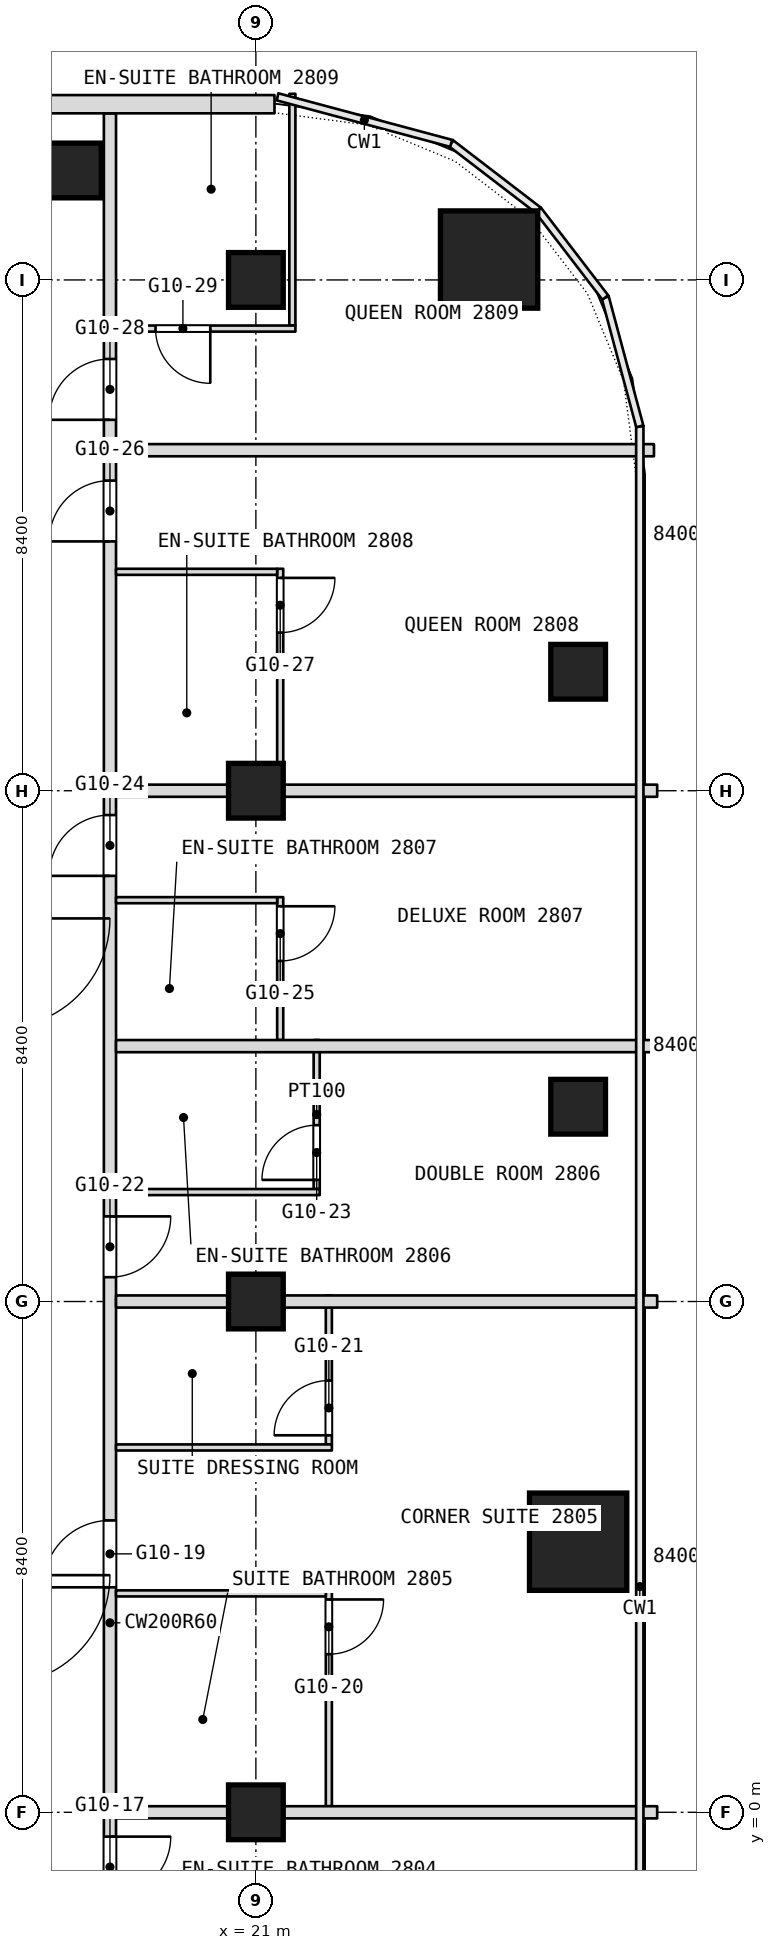
"""IFC4 building model, lengths in metres.
Left out: names, types, materials, properties, quantities, classifications, styles, units other than length and angle.
Written with IfcOpenShell. Run it as: python <this file> out.ifc"""

import sys

from ifc_helpers import new_model, si_unit, direction, frame, frame_2d, origin, origin_2d, place, context, subcontext, project, spatial, rectangle, extrude, element, fill, save


model = new_model("IFC4")
c1 = context("Model", 3, precision=1e-05, world=origin(), true_north=direction((0.0, 1.0)))
c2 = subcontext(c1, "Body", "Model", "MODEL_VIEW")
j1 = project(units=[si_unit("LENGTHUNIT", "METRE"), si_unit("PLANEANGLEUNIT", "RADIAN")], contexts=[c1])
p1 = place(None, origin())
s1 = spatial("IfcSite", under=j1, at=p1, CompositionType="ELEMENT")
p2 = place(p1, origin())
s2 = spatial("IfcBuilding", under=s1, at=p2, CompositionType="ELEMENT")
p3 = place(p2, frame((0.0, 0.0, 126.5)))
s3 = spatial("IfcBuildingStorey", under=s2, at=p3, CompositionType="ELEMENT", Elevation=126.5)
for number, where, z_axis, x_axis in (
    (1, (26.3, 4.45, 0.0), (0.0, 0.0, 1.0), (1.0, 0.0, 0.0)),
    (2, (24.835, 25.535, 0.0), (0.0, 0.0, 1.0), (1.0, 0.0, 0.0)),
):
    element("IfcColumn", number, at=place(p3, frame(where, z_axis=z_axis, x_axis=x_axis)), inside=s3, PredefinedType="COLUMN", context=c2, shape_type="SweptSolid", body=[
        extrude(rectangle(XDim=1.6, YDim=1.6, at=origin_2d()), origin(), (0.0, 0.0, 1.0), 3.6),
    ])
for number, where, z_axis, x_axis in (
    (3, (21.0, 0.0, 0.0), (0.0, 0.0, 1.0), (1.0, 0.0, 0.0)),
    (4, (21.0, 8.4, 0.0), (0.0, 0.0, 1.0), (1.0, 0.0, 0.0)),
    (5, (21.0, 16.8, 0.0), (0.0, 0.0, 1.0), (1.0, 0.0, 0.0)),
    (6, (21.0, 25.2, 0.0), (0.0, 0.0, 1.0), (1.0, 0.0, 0.0)),
    (7, (18.007, 27.0, 0.0), (0.0, 0.0, 1.0), (1.0, 0.0, 0.0)),
    (8, (26.3, 18.756, 0.0), (0.0, 0.0, 1.0), (1.0, 0.0, 0.0)),
    (9, (26.3, 11.603, 0.0), (0.0, 0.0, 1.0), (1.0, 0.0, 0.0)),
):
    element("IfcColumn", number, at=place(p3, frame(where, z_axis=z_axis, x_axis=x_axis)), inside=s3, PredefinedType="COLUMN", context=c2, shape_type="SweptSolid", body=[
        extrude(rectangle(XDim=0.9, YDim=0.9, at=origin_2d()), origin(), (0.0, 0.0, 1.0), 3.6),
    ])
p4 = place(p3, frame((22.2, 0.1, 0.0), z_axis=(0.0, 0.0, 1.0), x_axis=(0.0, 1.0, 0.0)))
e10 = element("IfcWall", 10, at=p4, inside=s3, PredefinedType="PARTITIONING", context=c2, shape_type="SweptSolid", body=[
    extrude(rectangle(XDim=3.55, YDim=0.1, at=frame_2d((1.775, 0.0))), origin(), (0.0, 0.0, 1.0), 3.34),
])
p5 = place(p4, frame((2.5, 0.0, 0.0)))
e11 = element("IfcOpeningElement", 11, at=p5, cuts=e10, PredefinedType="OPENING", context=c2, shape_type="SweptSolid", body=[
    extrude(rectangle(XDim=0.9, YDim=2.1, at=frame_2d((0.45, 1.05))), frame((0.0, 0.05, 0.0), z_axis=(0.0, -1.0, 0.0), x_axis=(1.0, 0.0, 0.0)), (0.0, 0.0, 1.0), 0.1),
])
p6 = place(p3, frame((22.2, 6.05, 0.0), z_axis=(0.0, 0.0, 1.0), x_axis=(0.0, 1.0, 0.0)))
e12 = element("IfcWall", 12, at=p6, inside=s3, PredefinedType="PARTITIONING", context=c2, shape_type="SweptSolid", body=[
    extrude(rectangle(XDim=2.45, YDim=0.1, at=frame_2d((1.225, 0.0))), origin(), (0.0, 0.0, 1.0), 3.34),
])
p7 = place(p6, frame((0.15, 0.0, 0.0)))
e13 = element("IfcOpeningElement", 13, at=p7, cuts=e12, PredefinedType="OPENING", context=c2, shape_type="SweptSolid", body=[
    extrude(rectangle(XDim=0.9, YDim=2.1, at=frame_2d((0.45, 1.05))), frame((0.0, 0.05, 0.0), z_axis=(0.0, -1.0, 0.0), x_axis=(1.0, 0.0, 0.0)), (0.0, 0.0, 1.0), 0.1),
])
p8 = place(p3, frame((22.0, 10.25, 0.0), z_axis=(0.0, 0.0, 1.0), x_axis=(0.0, 1.0, 0.0)))
e14 = element("IfcWall", 14, at=p8, inside=s3, PredefinedType="PARTITIONING", context=c2, shape_type="SweptSolid", body=[
    extrude(rectangle(XDim=2.45, YDim=0.1, at=frame_2d((1.225, 0.0))), origin(), (0.0, 0.0, 1.0), 3.34),
])
p9 = place(p8, frame((0.15, 0.0, 0.0)))
e15 = element("IfcOpeningElement", 15, at=p9, cuts=e14, PredefinedType="OPENING", context=c2, shape_type="SweptSolid", body=[
    extrude(rectangle(XDim=0.9, YDim=2.1, at=frame_2d((0.45, 1.05))), frame((0.0, 0.05, 0.0), z_axis=(0.0, -1.0, 0.0), x_axis=(1.0, 0.0, 0.0)), (0.0, 0.0, 1.0), 0.1),
])
p10 = place(p3, frame((21.6, 24.45, 0.0), z_axis=(0.0, 0.0, 1.0), x_axis=(0.0, 1.0, 0.0)))
e16 = element("IfcWall", 16, at=p10, inside=s3, PredefinedType="PARTITIONING", context=c2, shape_type="SweptSolid", body=[
    extrude(rectangle(XDim=3.811, YDim=0.1, at=frame_2d((1.906, 0.0))), origin(), (0.0, 0.0, 1.0), 3.34),
])
p11 = place(p3, frame((21.4, 12.7, 0.0), z_axis=(0.0, 0.0, 1.0), x_axis=(0.0, 1.0, 0.0)))
e17 = element("IfcWall", 17, at=p11, inside=s3, PredefinedType="PARTITIONING", context=c2, shape_type="SweptSolid", body=[
    extrude(rectangle(XDim=2.35, YDim=0.1, at=frame_2d((1.175, 0.0))), origin(), (0.0, 0.0, 1.0), 3.34),
])
p12 = place(p11, frame((1.3, 0.0, 0.0)))
e18 = element("IfcOpeningElement", 18, at=p12, cuts=e17, PredefinedType="OPENING", context=c2, shape_type="SweptSolid", body=[
    extrude(rectangle(XDim=0.9, YDim=2.1, at=frame_2d((0.45, 1.05))), frame((0.0, 0.05, 0.0), z_axis=(0.0, -1.0, 0.0), x_axis=(1.0, 0.0, 0.0)), (0.0, 0.0, 1.0), 0.1),
])
p13 = place(p3, frame((21.4, 16.9, 0.0), z_axis=(0.0, 0.0, 1.0), x_axis=(0.0, 1.0, 0.0)))
e19 = element("IfcWall", 19, at=p13, inside=s3, PredefinedType="PARTITIONING", context=c2, shape_type="SweptSolid", body=[
    extrude(rectangle(XDim=3.55, YDim=0.1, at=frame_2d((1.775, 0.0))), origin(), (0.0, 0.0, 1.0), 3.34),
])
p14 = place(p13, frame((2.5, 0.0, 0.0)))
e20 = element("IfcOpeningElement", 20, at=p14, cuts=e19, PredefinedType="OPENING", context=c2, shape_type="SweptSolid", body=[
    extrude(rectangle(XDim=0.9, YDim=2.1, at=frame_2d((0.45, 1.05))), frame((0.0, 0.05, 0.0), z_axis=(0.0, -1.0, 0.0), x_axis=(1.0, 0.0, 0.0)), (0.0, 0.0, 1.0), 0.1),
])
p15 = place(p3, frame((18.6, -21.708, 0.0), z_axis=(0.0, 0.0, 1.0), x_axis=(0.0, 1.0, 0.0)))
e21 = element("IfcWall", 21, at=p15, inside=s3, PredefinedType="PARTITIONING", context=c2, shape_type="SweptSolid", body=[
    extrude(rectangle(XDim=49.648, YDim=0.2, at=frame_2d((24.824, 0.0))), origin(), (0.0, 0.0, 1.0), 3.34),
])
p16 = place(p15, frame((2.204, 0.0, 0.0)))
e22 = element("IfcOpeningElement", 22, at=p16, cuts=e21, PredefinedType="OPENING", context=c2, shape_type="SweptSolid", body=[
    extrude(rectangle(XDim=0.9, YDim=2.1, at=frame_2d((0.45, 1.05))), frame((0.0, 0.1, 0.0), z_axis=(0.0, -1.0, 0.0), x_axis=(1.0, 0.0, 0.0)), (0.0, 0.0, 1.0), 0.2),
])
p17 = place(p15, frame((10.658, 0.0, 0.0)))
e23 = element("IfcOpeningElement", 23, at=p17, cuts=e21, PredefinedType="OPENING", context=c2, shape_type="SweptSolid", body=[
    extrude(rectangle(XDim=1.1, YDim=2.1, at=frame_2d((0.55, 1.05))), frame((0.0, 0.1, 0.0), z_axis=(0.0, -1.0, 0.0), x_axis=(1.0, 0.0, 0.0)), (0.0, 0.0, 1.0), 0.2),
])
p18 = place(p15, frame((13.708, 0.0, 0.0)))
e24 = element("IfcOpeningElement", 24, at=p18, cuts=e21, PredefinedType="OPENING", context=c2, shape_type="SweptSolid", body=[
    extrude(rectangle(XDim=1.0, YDim=2.1, at=frame_2d((0.5, 1.05))), frame((0.0, 0.1, 0.0), z_axis=(0.0, -1.0, 0.0), x_axis=(1.0, 0.0, 0.0)), (0.0, 0.0, 1.0), 0.2),
])
p19 = place(p15, frame((20.308, 0.0, 0.0)))
e25 = element("IfcOpeningElement", 25, at=p19, cuts=e21, PredefinedType="OPENING", context=c2, shape_type="SweptSolid", body=[
    extrude(rectangle(XDim=1.0, YDim=2.1, at=frame_2d((0.5, 1.05))), frame((0.0, 0.1, 0.0), z_axis=(0.0, -1.0, 0.0), x_axis=(1.0, 0.0, 0.0)), (0.0, 0.0, 1.0), 0.2),
])
p20 = place(p15, frame((25.408, 0.0, 0.0)))
e26 = element("IfcOpeningElement", 26, at=p20, cuts=e21, PredefinedType="OPENING", context=c2, shape_type="SweptSolid", body=[
    extrude(rectangle(XDim=1.1, YDim=2.1, at=frame_2d((0.55, 1.05))), frame((0.0, 0.1, 0.0), z_axis=(0.0, -1.0, 0.0), x_axis=(1.0, 0.0, 0.0)), (0.0, 0.0, 1.0), 0.2),
])
p21 = place(p15, frame((30.508, 0.0, 0.0)))
e27 = element("IfcOpeningElement", 27, at=p21, cuts=e21, PredefinedType="OPENING", context=c2, shape_type="SweptSolid", body=[
    extrude(rectangle(XDim=1.0, YDim=2.1, at=frame_2d((0.5, 1.05))), frame((0.0, 0.1, 0.0), z_axis=(0.0, -1.0, 0.0), x_axis=(1.0, 0.0, 0.0)), (0.0, 0.0, 1.0), 0.2),
])
p22 = place(p15, frame((37.108, 0.0, 0.0)))
e28 = element("IfcOpeningElement", 28, at=p22, cuts=e21, PredefinedType="OPENING", context=c2, shape_type="SweptSolid", body=[
    extrude(rectangle(XDim=1.0, YDim=2.1, at=frame_2d((0.5, 1.05))), frame((0.0, 0.1, 0.0), z_axis=(0.0, -1.0, 0.0), x_axis=(1.0, 0.0, 0.0)), (0.0, 0.0, 1.0), 0.2),
])
p23 = place(p15, frame((42.608, 0.0, 0.0)))
e29 = element("IfcOpeningElement", 29, at=p23, cuts=e21, PredefinedType="OPENING", context=c2, shape_type="SweptSolid", body=[
    extrude(rectangle(XDim=1.0, YDim=2.1, at=frame_2d((0.5, 1.05))), frame((0.0, 0.1, 0.0), z_axis=(0.0, -1.0, 0.0), x_axis=(1.0, 0.0, 0.0)), (0.0, 0.0, 1.0), 0.2),
])
p24 = place(p15, frame((44.608, 0.0, 0.0)))
e30 = element("IfcOpeningElement", 30, at=p24, cuts=e21, PredefinedType="OPENING", context=c2, shape_type="SweptSolid", body=[
    extrude(rectangle(XDim=1.0, YDim=2.1, at=frame_2d((0.5, 1.05))), frame((0.0, 0.1, 0.0), z_axis=(0.0, -1.0, 0.0), x_axis=(1.0, 0.0, 0.0)), (0.0, 0.0, 1.0), 0.2),
])
p25 = place(p3, frame((18.7, 0.0, 0.0), z_axis=(0.0, 0.0, 1.0), x_axis=(1.0, 0.0, 0.0)))
e31 = element("IfcWall", 31, at=p25, inside=s3, PredefinedType="PARTITIONING", context=c2, shape_type="SweptSolid", body=[
    extrude(rectangle(XDim=8.9, YDim=0.2, at=frame_2d((4.45, 0.0))), origin(), (0.0, 0.0, 1.0), 2.89),
])
p26 = place(p3, frame((18.7, 3.6, 0.0), z_axis=(0.0, 0.0, 1.0), x_axis=(1.0, 0.0, 0.0)))
e32 = element("IfcWall", 32, at=p26, inside=s3, PredefinedType="PARTITIONING", context=c2, shape_type="SweptSolid", body=[
    extrude(rectangle(XDim=3.45, YDim=0.1, at=frame_2d((1.725, 0.0))), origin(), (0.0, 0.0, 1.0), 3.34),
])
p27 = place(p3, frame((18.7, 6.0, 0.0), z_axis=(0.0, 0.0, 1.0), x_axis=(1.0, 0.0, 0.0)))
e33 = element("IfcWall", 33, at=p27, inside=s3, PredefinedType="PARTITIONING", context=c2, shape_type="SweptSolid", body=[
    extrude(rectangle(XDim=3.55, YDim=0.1, at=frame_2d((1.775, 0.0))), origin(), (0.0, 0.0, 1.0), 3.34),
])
p28 = place(p3, frame((18.7, 8.4, 0.0), z_axis=(0.0, 0.0, 1.0), x_axis=(1.0, 0.0, 0.0)))
e34 = element("IfcWall", 34, at=p28, inside=s3, PredefinedType="PARTITIONING", context=c2, shape_type="SweptSolid", body=[
    extrude(rectangle(XDim=8.9, YDim=0.2, at=frame_2d((4.45, 0.0))), origin(), (0.0, 0.0, 1.0), 2.89),
])
p29 = place(p3, frame((18.7, 10.2, 0.0), z_axis=(0.0, 0.0, 1.0), x_axis=(1.0, 0.0, 0.0)))
e35 = element("IfcWall", 35, at=p29, inside=s3, PredefinedType="PARTITIONING", context=c2, shape_type="SweptSolid", body=[
    extrude(rectangle(XDim=3.35, YDim=0.1, at=frame_2d((1.675, 0.0))), origin(), (0.0, 0.0, 1.0), 3.34),
])
p30 = place(p3, frame((18.7, 12.6, 0.0), z_axis=(0.0, 0.0, 1.0), x_axis=(1.0, 0.0, 0.0)))
e36 = element("IfcWall", 36, at=p30, inside=s3, PredefinedType="PARTITIONING", context=c2, shape_type="SweptSolid", body=[
    extrude(rectangle(XDim=8.9, YDim=0.2, at=frame_2d((4.45, 0.0))), origin(), (0.0, 0.0, 1.0), 3.34),
])
p31 = place(p3, frame((18.7, 15.0, 0.0), z_axis=(0.0, 0.0, 1.0), x_axis=(1.0, 0.0, 0.0)))
e37 = element("IfcWall", 37, at=p31, inside=s3, PredefinedType="PARTITIONING", context=c2, shape_type="SweptSolid", body=[
    extrude(rectangle(XDim=2.65, YDim=0.1, at=frame_2d((1.325, 0.0))), origin(), (0.0, 0.0, 1.0), 3.34),
])
p32 = place(p3, frame((18.7, 16.8, 0.0), z_axis=(0.0, 0.0, 1.0), x_axis=(1.0, 0.0, 0.0)))
e38 = element("IfcWall", 38, at=p32, inside=s3, PredefinedType="PARTITIONING", context=c2, shape_type="SweptSolid", body=[
    extrude(rectangle(XDim=8.9, YDim=0.2, at=frame_2d((4.45, 0.0))), origin(), (0.0, 0.0, 1.0), 2.89),
])
p33 = place(p3, frame((18.7, 20.4, 0.0), z_axis=(0.0, 0.0, 1.0), x_axis=(1.0, 0.0, 0.0)))
e39 = element("IfcWall", 39, at=p33, inside=s3, PredefinedType="PARTITIONING", context=c2, shape_type="SweptSolid", body=[
    extrude(rectangle(XDim=2.65, YDim=0.1, at=frame_2d((1.325, 0.0))), origin(), (0.0, 0.0, 1.0), 3.34),
])
p34 = place(p3, frame((18.7, 22.4, 0.0), z_axis=(0.0, 0.0, 1.0), x_axis=(1.0, 0.0, 0.0)))
e40 = element("IfcWall", 40, at=p34, inside=s3, PredefinedType="PARTITIONING", context=c2, shape_type="SweptSolid", body=[
    extrude(rectangle(XDim=8.847, YDim=0.2, at=frame_2d((4.424, 0.0))), origin(), (0.0, 0.0, 1.0), 3.34),
])
p35 = place(p3, frame((18.7, 24.4, 0.0), z_axis=(0.0, 0.0, 1.0), x_axis=(1.0, 0.0, 0.0)))
e41 = element("IfcWall", 41, at=p35, inside=s3, PredefinedType="PARTITIONING", context=c2, shape_type="SweptSolid", body=[
    extrude(rectangle(XDim=2.95, YDim=0.1, at=frame_2d((1.475, 0.0))), origin(), (0.0, 0.0, 1.0), 3.34),
])
p36 = place(p35, frame((0.65, 0.0, 0.0)))
e42 = element("IfcOpeningElement", 42, at=p36, cuts=e41, PredefinedType="OPENING", context=c2, shape_type="SweptSolid", body=[
    extrude(rectangle(XDim=0.9, YDim=2.1, at=frame_2d((0.45, 1.05))), frame((0.0, 0.05, 0.0), z_axis=(0.0, -1.0, 0.0), x_axis=(1.0, 0.0, 0.0)), (0.0, 0.0, 1.0), 0.1),
])
p37 = place(p3, frame((21.306, 28.09, 0.0), z_axis=(0.0, 0.0, 1.0), x_axis=(-1.0, 0.0, 0.0)))
e43 = element("IfcWall", 43, at=p37, inside=s3, PredefinedType="NOTDEFINED", context=c2, shape_type="SweptSolid", body=[
    extrude(rectangle(XDim=42.612, YDim=0.3, at=frame_2d((21.306, 0.0))), origin(), (0.0, 0.0, 1.0), 3.6),
])
p38 = place(p37, frame((5.406, 0.0, 0.9)))
e44 = element("IfcOpeningElement", 44, at=p38, cuts=e43, PredefinedType="OPENING", context=c2, shape_type="SweptSolid", body=[
    extrude(rectangle(XDim=2.4, YDim=2.1, at=frame_2d((1.2, 1.05))), frame((0.0, 0.15, 0.0), z_axis=(0.0, -1.0, 0.0), x_axis=(1.0, 0.0, 0.0)), (0.0, 0.0, 1.0), 0.3),
])
p39 = place(p37, frame((9.606, 0.0, 0.9)))
e45 = element("IfcOpeningElement", 45, at=p39, cuts=e43, PredefinedType="OPENING", context=c2, shape_type="SweptSolid", body=[
    extrude(rectangle(XDim=2.4, YDim=2.1, at=frame_2d((1.2, 1.05))), frame((0.0, 0.15, 0.0), z_axis=(0.0, -1.0, 0.0), x_axis=(1.0, 0.0, 0.0)), (0.0, 0.0, 1.0), 0.3),
])
p40 = place(p37, frame((13.806, 0.0, 0.9)))
e46 = element("IfcOpeningElement", 46, at=p40, cuts=e43, PredefinedType="OPENING", context=c2, shape_type="SweptSolid", body=[
    extrude(rectangle(XDim=2.4, YDim=2.1, at=frame_2d((1.2, 1.05))), frame((0.0, 0.15, 0.0), z_axis=(0.0, -1.0, 0.0), x_axis=(1.0, 0.0, 0.0)), (0.0, 0.0, 1.0), 0.3),
])
p41 = place(p37, frame((18.006, 0.0, 0.9)))
e47 = element("IfcOpeningElement", 47, at=p41, cuts=e43, PredefinedType="OPENING", context=c2, shape_type="SweptSolid", body=[
    extrude(rectangle(XDim=2.4, YDim=2.1, at=frame_2d((1.2, 1.05))), frame((0.0, 0.15, 0.0), z_axis=(0.0, -1.0, 0.0), x_axis=(1.0, 0.0, 0.0)), (0.0, 0.0, 1.0), 0.3),
])
p42 = place(p37, frame((22.206, 0.0, 0.9)))
e48 = element("IfcOpeningElement", 48, at=p42, cuts=e43, PredefinedType="OPENING", context=c2, shape_type="SweptSolid", body=[
    extrude(rectangle(XDim=2.4, YDim=2.1, at=frame_2d((1.2, 1.05))), frame((0.0, 0.15, 0.0), z_axis=(0.0, -1.0, 0.0), x_axis=(1.0, 0.0, 0.0)), (0.0, 0.0, 1.0), 0.3),
])
p43 = place(p37, frame((26.406, 0.0, 0.9)))
e49 = element("IfcOpeningElement", 49, at=p43, cuts=e43, PredefinedType="OPENING", context=c2, shape_type="SweptSolid", body=[
    extrude(rectangle(XDim=2.4, YDim=2.1, at=frame_2d((1.2, 1.05))), frame((0.0, 0.15, 0.0), z_axis=(0.0, -1.0, 0.0), x_axis=(1.0, 0.0, 0.0)), (0.0, 0.0, 1.0), 0.3),
])
p44 = place(p37, frame((30.606, 0.0, 0.9)))
e50 = element("IfcOpeningElement", 50, at=p44, cuts=e43, PredefinedType="OPENING", context=c2, shape_type="SweptSolid", body=[
    extrude(rectangle(XDim=2.4, YDim=2.1, at=frame_2d((1.2, 1.05))), frame((0.0, 0.15, 0.0), z_axis=(0.0, -1.0, 0.0), x_axis=(1.0, 0.0, 0.0)), (0.0, 0.0, 1.0), 0.3),
])
p45 = place(p37, frame((34.806, 0.0, 0.9)))
e51 = element("IfcOpeningElement", 51, at=p45, cuts=e43, PredefinedType="OPENING", context=c2, shape_type="SweptSolid", body=[
    extrude(rectangle(XDim=2.4, YDim=2.1, at=frame_2d((1.2, 1.05))), frame((0.0, 0.15, 0.0), z_axis=(0.0, -1.0, 0.0), x_axis=(1.0, 0.0, 0.0)), (0.0, 0.0, 1.0), 0.3),
])
p46 = place(p5, origin())
e52 = element("IfcDoor", 52, at=p46, inside=s3, OperationType="SINGLE_SWING_RIGHT", PredefinedType="DOOR", context=c2, shape_type="SweptSolid", body=[
    extrude(rectangle(XDim=0.9, YDim=2.1, at=frame_2d((0.45, 1.05))), frame((0.0, 0.025, 0.0), z_axis=(0.0, -1.0, 0.0), x_axis=(1.0, 0.0, 0.0)), (0.0, 0.0, 1.0), 0.05),
])
fill(e11, e52)
p47 = place(p7, origin())
e53 = element("IfcDoor", 53, at=p47, inside=s3, OperationType="SINGLE_SWING_LEFT", PredefinedType="DOOR", context=c2, shape_type="SweptSolid", body=[
    extrude(rectangle(XDim=0.9, YDim=2.1, at=frame_2d((0.45, 1.05))), frame((0.0, 0.025, 0.0), z_axis=(0.0, -1.0, 0.0), x_axis=(1.0, 0.0, 0.0)), (0.0, 0.0, 1.0), 0.05),
])
fill(e13, e53)
p48 = place(p9, origin())
e54 = element("IfcDoor", 54, at=p48, inside=s3, OperationType="SINGLE_SWING_LEFT", PredefinedType="DOOR", context=c2, shape_type="SweptSolid", body=[
    extrude(rectangle(XDim=0.9, YDim=2.1, at=frame_2d((0.45, 1.05))), frame((0.0, 0.025, 0.0), z_axis=(0.0, -1.0, 0.0), x_axis=(1.0, 0.0, 0.0)), (0.0, 0.0, 1.0), 0.05),
])
fill(e15, e54)
p49 = place(p12, origin())
e55 = element("IfcDoor", 55, at=p49, inside=s3, OperationType="SINGLE_SWING_RIGHT", PredefinedType="DOOR", context=c2, shape_type="SweptSolid", body=[
    extrude(rectangle(XDim=0.9, YDim=2.1, at=frame_2d((0.45, 1.05))), frame((0.0, 0.025, 0.0), z_axis=(0.0, -1.0, 0.0), x_axis=(1.0, 0.0, 0.0)), (0.0, 0.0, 1.0), 0.05),
])
fill(e18, e55)
p50 = place(p14, origin())
e56 = element("IfcDoor", 56, at=p50, inside=s3, OperationType="SINGLE_SWING_RIGHT", PredefinedType="DOOR", context=c2, shape_type="SweptSolid", body=[
    extrude(rectangle(XDim=0.9, YDim=2.1, at=frame_2d((0.45, 1.05))), frame((0.0, 0.025, 0.0), z_axis=(0.0, -1.0, 0.0), x_axis=(1.0, 0.0, 0.0)), (0.0, 0.0, 1.0), 0.05),
])
fill(e20, e56)
p51 = place(p19, origin())
e57 = element("IfcDoor", 57, at=p51, inside=s3, OperationType="SINGLE_SWING_LEFT", PredefinedType="DOOR", context=c2, shape_type="SweptSolid", body=[
    extrude(rectangle(XDim=1.0, YDim=2.1, at=frame_2d((0.5, 1.05))), frame((0.0, 0.025, 0.0), z_axis=(0.0, -1.0, 0.0), x_axis=(1.0, 0.0, 0.0)), (0.0, 0.0, 1.0), 0.05),
])
fill(e25, e57)
p52 = place(p20, origin())
e58 = element("IfcDoor", 58, at=p52, inside=s3, OperationType="SINGLE_SWING_RIGHT", PredefinedType="DOOR", context=c2, shape_type="SweptSolid", body=[
    extrude(rectangle(XDim=1.1, YDim=2.1, at=frame_2d((0.55, 1.05))), frame((0.0, 0.025, 0.0), z_axis=(0.0, -1.0, 0.0), x_axis=(1.0, 0.0, 0.0)), (0.0, 0.0, 1.0), 0.05),
])
fill(e26, e58)
p53 = place(p21, origin())
e59 = element("IfcDoor", 59, at=p53, inside=s3, OperationType="SINGLE_SWING_RIGHT", PredefinedType="DOOR", context=c2, shape_type="SweptSolid", body=[
    extrude(rectangle(XDim=1.0, YDim=2.1, at=frame_2d((0.5, 1.05))), frame((0.0, 0.025, 0.0), z_axis=(0.0, -1.0, 0.0), x_axis=(1.0, 0.0, 0.0)), (0.0, 0.0, 1.0), 0.05),
])
fill(e27, e59)
p54 = place(p22, origin())
e60 = element("IfcDoor", 60, at=p54, inside=s3, OperationType="SINGLE_SWING_RIGHT", PredefinedType="DOOR", context=c2, shape_type="SweptSolid", body=[
    extrude(rectangle(XDim=1.0, YDim=2.1, at=frame_2d((0.5, 1.05))), frame((0.0, 0.025, 0.0), z_axis=(0.0, -1.0, 0.0), x_axis=(1.0, 0.0, 0.0)), (0.0, 0.0, 1.0), 0.05),
])
fill(e28, e60)
p55 = place(p23, origin())
e61 = element("IfcDoor", 61, at=p55, inside=s3, OperationType="SINGLE_SWING_RIGHT", PredefinedType="DOOR", context=c2, shape_type="SweptSolid", body=[
    extrude(rectangle(XDim=1.0, YDim=2.1, at=frame_2d((0.5, 1.05))), frame((0.0, 0.025, 0.0), z_axis=(0.0, -1.0, 0.0), x_axis=(1.0, 0.0, 0.0)), (0.0, 0.0, 1.0), 0.05),
])
fill(e29, e61)
p56 = place(p24, origin())
e62 = element("IfcDoor", 62, at=p56, inside=s3, OperationType="SINGLE_SWING_RIGHT", PredefinedType="DOOR", context=c2, shape_type="SweptSolid", body=[
    extrude(rectangle(XDim=1.0, YDim=2.1, at=frame_2d((0.5, 1.05))), frame((0.0, 0.025, 0.0), z_axis=(0.0, -1.0, 0.0), x_axis=(1.0, 0.0, 0.0)), (0.0, 0.0, 1.0), 0.05),
])
fill(e30, e62)
p57 = place(p36, origin())
e63 = element("IfcDoor", 63, at=p57, inside=s3, OperationType="SINGLE_SWING_RIGHT", PredefinedType="DOOR", context=c2, shape_type="SweptSolid", body=[
    extrude(rectangle(XDim=0.9, YDim=2.1, at=frame_2d((0.45, 1.05))), frame((0.0, 0.025, 0.0), z_axis=(0.0, -1.0, 0.0), x_axis=(1.0, 0.0, 0.0)), (0.0, 0.0, 1.0), 0.05),
])
fill(e42, e63)
save(model, sys.argv[1])
